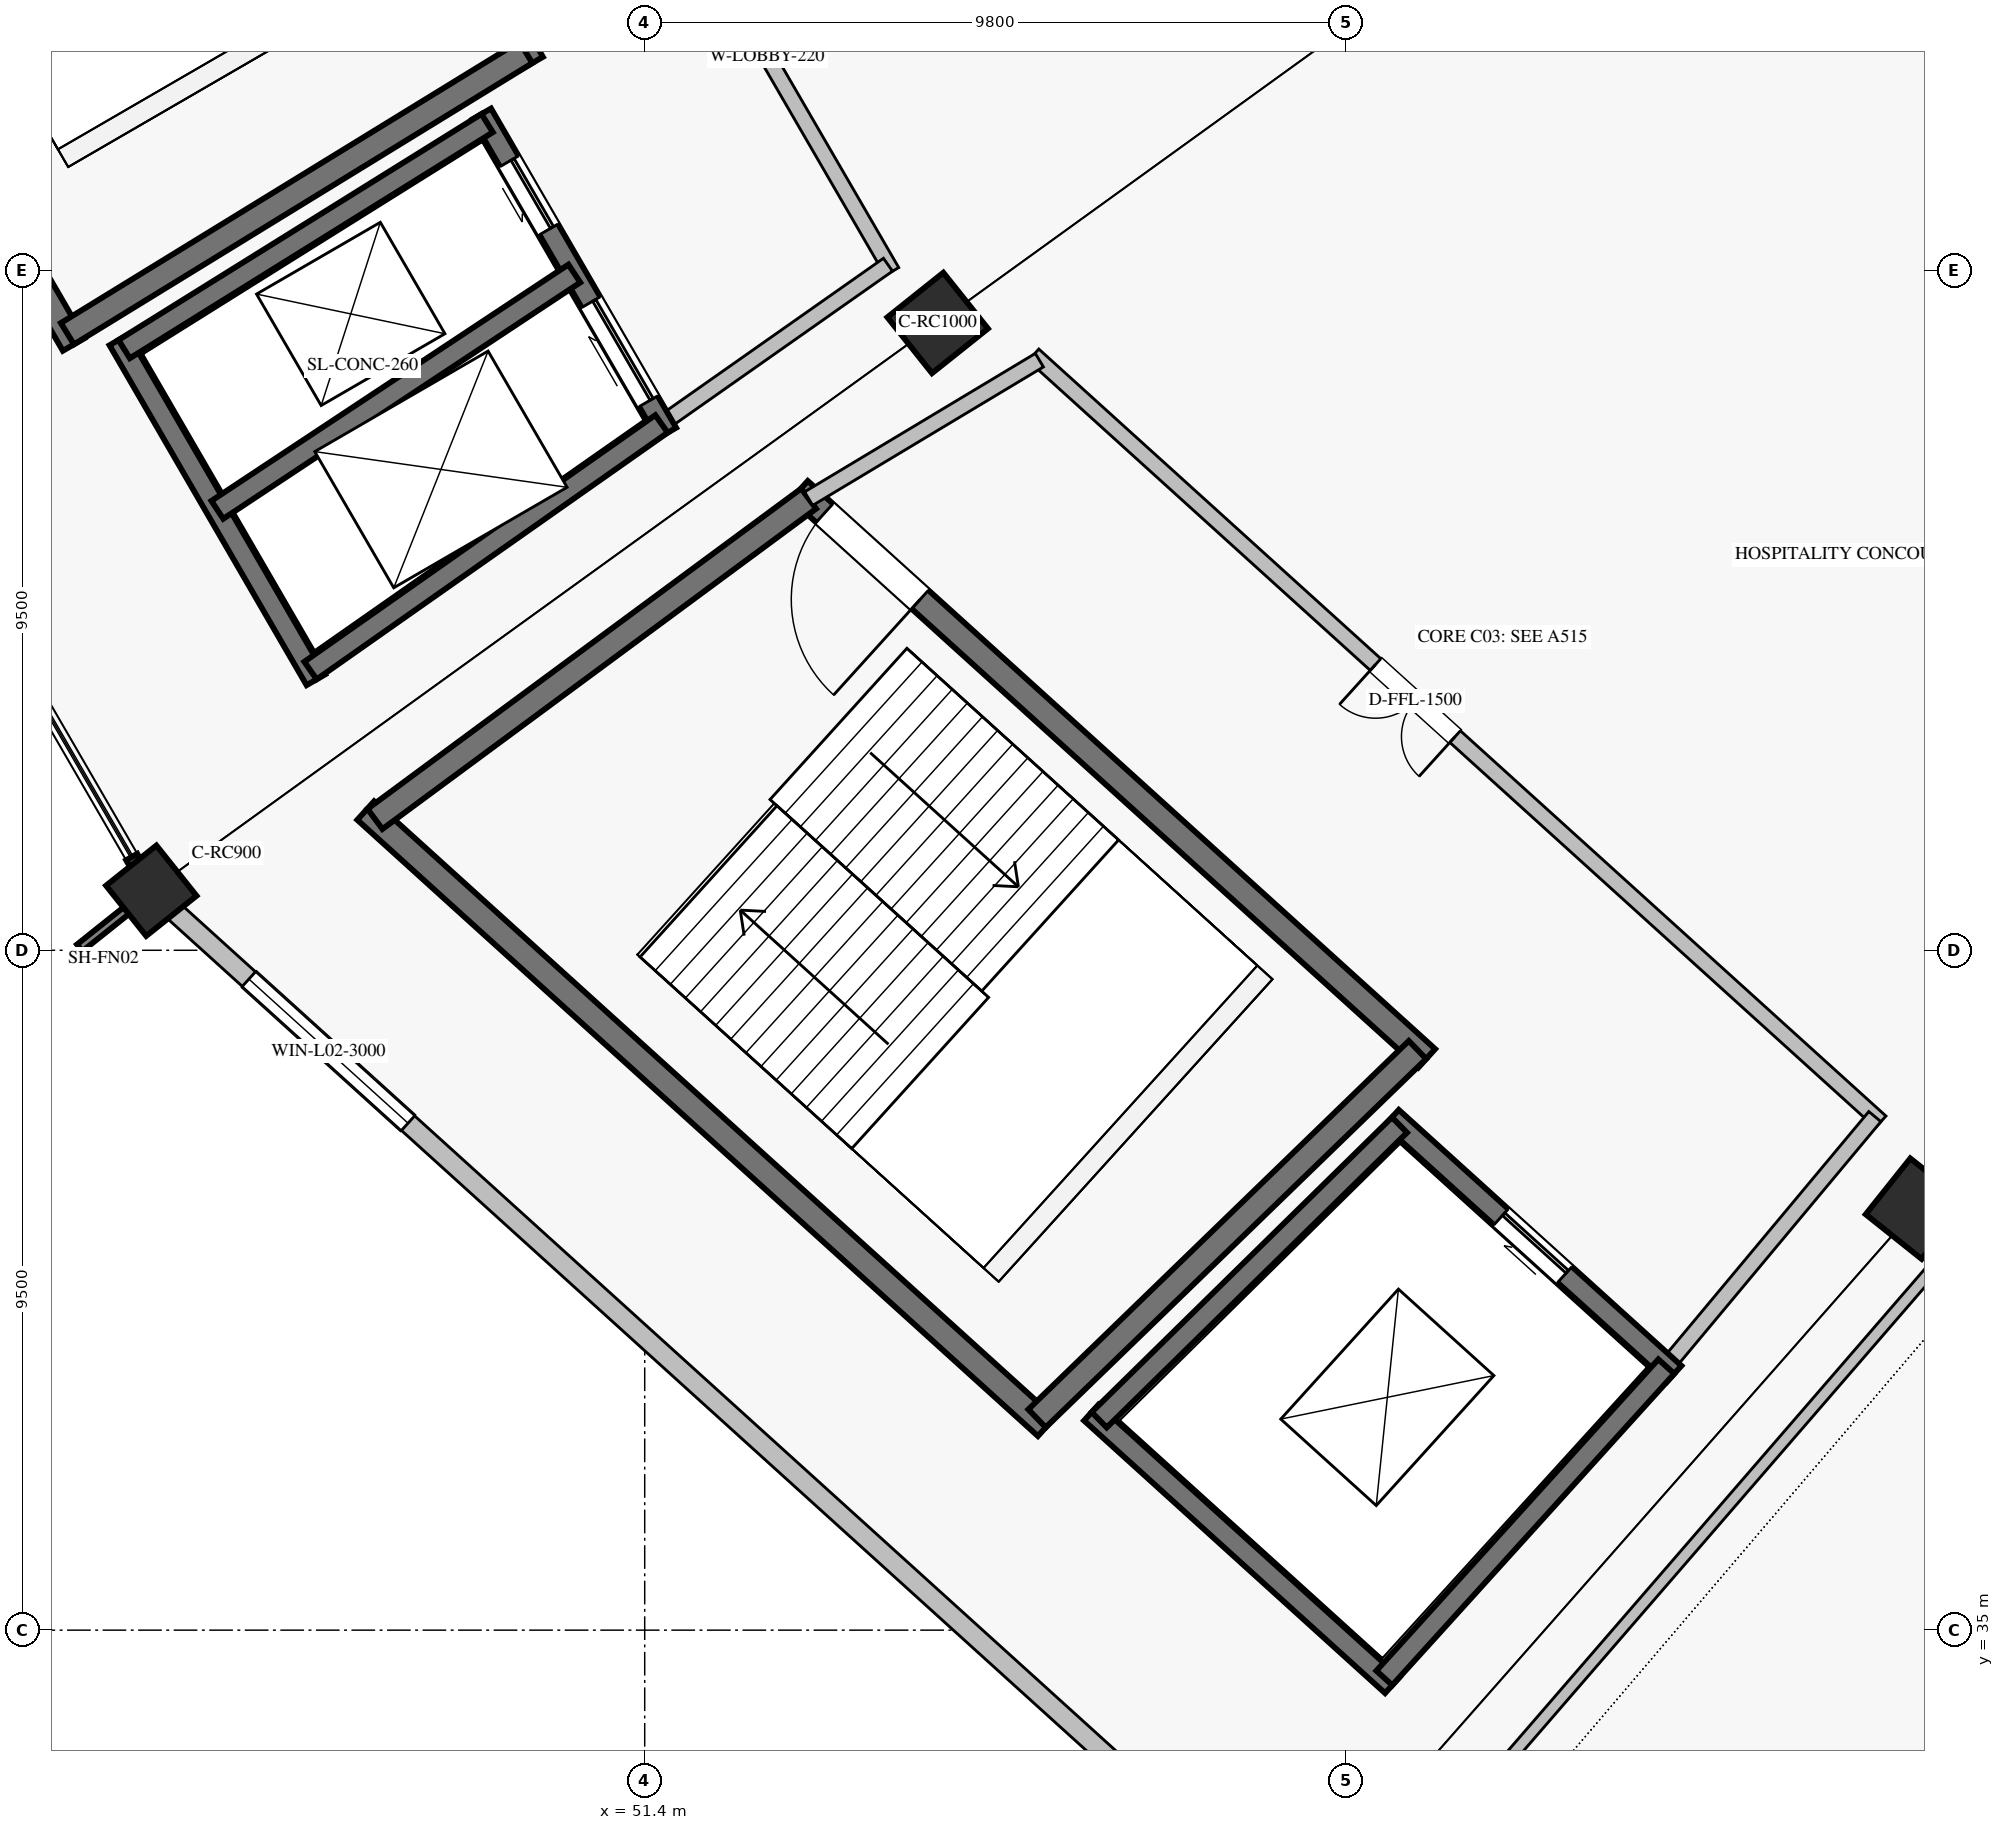
"""IFC4 building model, lengths in metres.
Left out: names, types, materials, properties, quantities, classifications, styles, units other than length and angle.
Written with IfcOpenShell. Run it as: python <this file> out.ifc"""

import sys

from ifc_helpers import new_model, si_unit, direction, frame, frame_2d, origin, origin_2d, place, context, subcontext, project, spatial, rectangle, extrude, element, fill, save


model = new_model("IFC4")
c1 = context("Model", 3, precision=1e-05, world=origin(), true_north=direction((0.0, 1.0)))
c2 = subcontext(c1, "Body", "Model", "MODEL_VIEW")
j1 = project(units=[si_unit("LENGTHUNIT", "METRE"), si_unit("PLANEANGLEUNIT", "RADIAN")], contexts=[c1])
p1 = place(None, origin())
s1 = spatial("IfcSite", under=j1, at=p1, CompositionType="ELEMENT")
p2 = place(p1, origin())
s2 = spatial("IfcBuilding", under=s1, at=p2, CompositionType="ELEMENT")
p3 = place(p2, frame((0.0, 0.0, 10.54)))
s3 = spatial("IfcBuildingStorey", under=s2, at=p3, CompositionType="ELEMENT", Elevation=10.54)
for number, where, z_axis, x_axis in (
    (1, (55.494, 53.266, 0.0), (0.0, 0.0, 1.0), (-0.782, -0.623, 0.0)),
    (2, (69.166, 40.889, 0.0), (0.0, 0.0, 1.0), (-0.623, -0.782, 0.0)),
):
    element("IfcColumn", number, at=place(p3, frame(where, z_axis=z_axis, x_axis=x_axis)), inside=s3, PredefinedType="COLUMN", context=c2, shape_type="SweptSolid", body=[
        extrude(rectangle(XDim=1.0, YDim=1.0, at=origin_2d()), origin(), (0.0, 0.0, 1.0), 5.1),
    ])
p4 = place(p3, frame((44.505, 45.332, 0.0), z_axis=(0.0, 0.0, 1.0), x_axis=(-0.781831482473, -0.623489801853, 0.0)))
e3 = element("IfcColumn", 3, at=p4, inside=s3, PredefinedType="COLUMN", context=c2, shape_type="SweptSolid", body=[
    extrude(rectangle(XDim=0.9, YDim=0.9, at=origin_2d()), origin(), (0.0, 0.0, 1.0), 5.1),
])
p5 = place(p3, frame((44.831, 45.037, 0.0), z_axis=(0.0, 0.0, 1.0), x_axis=(0.741352367697, -0.671115986183, 0.0)))
e4 = element("IfcWall", 4, at=p5, inside=s3, PredefinedType="SOLIDWALL", context=c2, shape_type="SweptSolid", body=[
    extrude(rectangle(XDim=20.564, YDim=0.275, at=frame_2d((10.282, 0.0))), origin(), (0.0, 0.0, 1.0), 4.138),
])
p6 = place(p5, frame((1.4, 0.0, 1.0)))
e5 = element("IfcOpeningElement", 5, at=p6, cuts=e4, PredefinedType="OPENING", context=c2, shape_type="SweptSolid", body=[
    extrude(rectangle(XDim=3.0, YDim=2.1, at=frame_2d((1.5, 1.05))), frame((0.0, 0.147, 0.0), z_axis=(0.0, -1.0, 0.0), x_axis=(1.0, 0.0, 0.0)), (0.0, 0.0, 1.0), 0.295),
])
p7 = place(p3, frame((44.09, 66.788, 0.0), z_axis=(0.0, 0.0, 1.0), x_axis=(0.501628624814, -0.865083072755, 0.0)))
e6 = element("IfcWall", 6, at=p7, inside=s3, PredefinedType="SHEAR", context=c2, shape_type="SweptSolid", body=[
    extrude(rectangle(XDim=11.435, YDim=0.35, at=frame_2d((5.718, 0.0))), origin(), (0.0, 0.0, 1.0), 4.84),
])
p8 = place(p7, frame((0.475, 0.0, 0.0)))
e7 = element("IfcOpeningElement", 7, at=p8, cuts=e6, PredefinedType="OPENING", context=c2, shape_type="SweptSolid", body=[
    extrude(rectangle(XDim=1.8, YDim=2.2, at=frame_2d((0.9, 1.1))), frame((0.0, 0.185, 0.0), z_axis=(0.0, -1.0, 0.0), x_axis=(1.0, 0.0, 0.0)), (0.0, 0.0, 1.0), 0.37),
])
p9 = place(p3, frame((37.198, 63.695, 0.0), z_axis=(0.0, 0.0, 1.0), x_axis=(0.501601740165, -0.865098661577, 0.0)))
e8 = element("IfcWall", 8, at=p9, inside=s3, PredefinedType="SHEAR", context=c2, shape_type="SweptSolid", body=[
    extrude(rectangle(XDim=12.405, YDim=0.35, at=frame_2d((6.202, 0.0))), origin(), (0.0, 0.0, 1.0), 4.84),
])
p10 = place(p3, frame((49.739, 57.046, 0.0), z_axis=(0.0, 0.0, 1.0), x_axis=(-0.852334575619, -0.522996913188, 0.0)))
e9 = element("IfcWall", 9, at=p10, inside=s3, PredefinedType="SHEAR", context=c2, shape_type="SweptSolid", body=[
    extrude(rectangle(XDim=7.516, YDim=0.35, at=frame_2d((3.758, 0.0))), origin(), (0.0, 0.0, 1.0), 4.84),
])
p11 = place(p3, frame((49.123, 56.188, 0.0), z_axis=(0.0, 0.0, 1.0), x_axis=(0.501629534056, -0.86508254552, 0.0)))
e10 = element("IfcWall", 10, at=p11, inside=s3, PredefinedType="SHEAR", context=c2, shape_type="SweptSolid", body=[
    extrude(rectangle(XDim=5.157, YDim=0.3, at=frame_2d((2.579, 0.0))), origin(), (0.0, 0.0, 1.0), 4.84),
])
p12 = place(p11, frame((0.766, 0.0, 0.0)))
e11 = element("IfcOpeningElement", 11, at=p12, cuts=e10, PredefinedType="OPENING", context=c2, shape_type="SweptSolid", body=[
    extrude(rectangle(XDim=1.1, YDim=2.2, at=frame_2d((0.55, 1.1))), frame((0.0, 0.16, 0.0), z_axis=(0.0, -1.0, 0.0), x_axis=(1.0, 0.0, 0.0)), (0.0, 0.0, 1.0), 0.32),
])
p13 = place(p11, frame((3.042, 0.0, 0.0)))
e12 = element("IfcOpeningElement", 12, at=p13, cuts=e10, PredefinedType="OPENING", context=c2, shape_type="SweptSolid", body=[
    extrude(rectangle(XDim=1.6, YDim=2.3, at=frame_2d((0.8, 1.15))), frame((0.0, 0.16, 0.0), z_axis=(0.0, -1.0, 0.0), x_axis=(1.0, 0.0, 0.0)), (0.0, 0.0, 1.0), 0.32),
])
p14 = place(p3, frame((44.05, 53.03, 0.0), z_axis=(0.0, 0.0, 1.0), x_axis=(0.501596987756, -0.865101417103, 0.0)))
e13 = element("IfcWall", 13, at=p14, inside=s3, PredefinedType="SHEAR", context=c2, shape_type="SweptSolid", body=[
    extrude(rectangle(XDim=5.491, YDim=0.3, at=frame_2d((2.746, 0.0))), origin(), (0.0, 0.0, 1.0), 4.84),
])
p15 = place(p3, frame((49.198, 56.058, 0.0), z_axis=(0.0, 0.0, 1.0), x_axis=(-0.848938067893, -0.528492343257, 0.0)))
e14 = element("IfcWall", 14, at=p15, inside=s3, PredefinedType="SHEAR", context=c2, shape_type="SweptSolid", body=[
    extrude(rectangle(XDim=5.975, YDim=0.3, at=frame_2d((2.988, 0.0))), origin(), (0.0, 0.0, 1.0), 4.84),
])
p16 = place(p3, frame((51.635, 51.855, 0.0), z_axis=(0.0, 0.0, 1.0), x_axis=(-0.818205158105, -0.574926359851, 0.0)))
e15 = element("IfcWall", 15, at=p16, inside=s3, PredefinedType="SHEAR", context=c2, shape_type="SweptSolid", body=[
    extrude(rectangle(XDim=5.995, YDim=0.3, at=frame_2d((2.998, 0.0))), origin(), (0.0, 0.0, 1.0), 4.84),
])
p17 = place(p3, frame((50.417, 53.957, 0.0), z_axis=(0.0, 0.0, 1.0), x_axis=(-0.833878900042, -0.551947443209, 0.0)))
e16 = element("IfcWall", 16, at=p17, inside=s3, PredefinedType="SHEAR", context=c2, shape_type="SweptSolid", body=[
    extrude(rectangle(XDim=5.983, YDim=0.3, at=frame_2d((2.991, 0.0))), origin(), (0.0, 0.0, 1.0), 4.84),
])
p18 = place(p3, frame((46.774, 67.921, 0.0), z_axis=(0.0, 0.0, 1.0), x_axis=(0.501612626242, -0.865092349518, 0.0)))
e17 = element("IfcWall", 17, at=p18, inside=s3, PredefinedType="SOLIDWALL", context=c2, shape_type="SweptSolid", body=[
    extrude(rectangle(XDim=16.11, YDim=0.22, at=frame_2d((8.055, 0.0))), origin(), (0.0, 0.0, 1.0), 3.788),
])
p19 = place(p18, frame((6.511, 0.0, 0.0)))
e18 = element("IfcOpeningElement", 18, at=p19, cuts=e17, PredefinedType="OPENING", context=c2, shape_type="SweptSolid", body=[
    extrude(rectangle(XDim=1.5, YDim=2.2, at=frame_2d((0.75, 1.1))), frame((0.0, 0.12, 0.0), z_axis=(0.0, -1.0, 0.0), x_axis=(1.0, 0.0, 0.0)), (0.0, 0.0, 1.0), 0.24),
])
p20 = place(p3, frame((54.8, 54.079, 0.0), z_axis=(0.0, 0.0, 1.0), x_axis=(-0.818225400643, -0.574897550649, 0.0)))
e19 = element("IfcWall", 19, at=p20, inside=s3, PredefinedType="SOLIDWALL", context=c2, shape_type="SweptSolid", body=[
    extrude(rectangle(XDim=3.868, YDim=0.22, at=frame_2d((1.934, 0.0))), origin(), (0.0, 0.0, 1.0), 4.84),
])
p21 = place(p3, frame((53.561, 50.928, 0.0), z_axis=(0.0, 0.0, 1.0), x_axis=(0.741358227035, -0.671109513572, 0.0)))
e20 = element("IfcWall", 20, at=p21, inside=s3, PredefinedType="SHEAR", context=c2, shape_type="SweptSolid", body=[
    extrude(rectangle(XDim=11.827, YDim=0.35, at=frame_2d((5.913, 0.0))), origin(), (0.0, 0.0, 1.0), 4.84),
])
p22 = place(p21, frame((0.475, 0.0, 0.0)))
e21 = element("IfcOpeningElement", 21, at=p22, cuts=e20, PredefinedType="OPENING", context=c2, shape_type="SweptSolid", body=[
    extrude(rectangle(XDim=1.8, YDim=2.2, at=frame_2d((0.9, 1.1))), frame((0.0, 0.185, 0.0), z_axis=(0.0, -1.0, 0.0), x_axis=(1.0, 0.0, 0.0)), (0.0, 0.0, 1.0), 0.37),
])
p23 = place(p3, frame((47.501, 46.452, 0.0), z_axis=(0.0, 0.0, 1.0), x_axis=(0.741351373721, -0.671117084183, 0.0)))
e22 = element("IfcWall", 22, at=p23, inside=s3, PredefinedType="SHEAR", context=c2, shape_type="SweptSolid", body=[
    extrude(rectangle(XDim=12.83, YDim=0.35, at=frame_2d((6.415, 0.0))), origin(), (0.0, 0.0, 1.0), 4.84),
])
p24 = place(p3, frame((53.691, 50.811, 0.0), z_axis=(0.0, 0.0, 1.0), x_axis=(-0.804395625347, -0.594093997548, 0.0)))
e23 = element("IfcWall", 23, at=p24, inside=s3, PredefinedType="SHEAR", context=c2, shape_type="SweptSolid", body=[
    extrude(rectangle(XDim=7.534, YDim=0.35, at=frame_2d((3.767, 0.0))), origin(), (0.0, 0.0, 1.0), 4.84),
])
p25 = place(p3, frame((62.199, 43.108, 0.0), z_axis=(0.0, 0.0, 1.0), x_axis=(-0.718297398554, -0.69573619083, 0.0)))
e24 = element("IfcWall", 24, at=p25, inside=s3, PredefinedType="SHEAR", context=c2, shape_type="SweptSolid", body=[
    extrude(rectangle(XDim=7.402, YDim=0.35, at=frame_2d((3.701, 0.0))), origin(), (0.0, 0.0, 1.0), 4.84),
])
p26 = place(p3, frame((61.837, 42.159, 0.0), z_axis=(0.0, 0.0, 1.0), x_axis=(0.741350155641, -0.671118429736, 0.0)))
e25 = element("IfcWall", 25, at=p26, inside=s3, PredefinedType="SHEAR", context=c2, shape_type="SweptSolid", body=[
    extrude(rectangle(XDim=5.329, YDim=0.3, at=frame_2d((2.665, 0.0))), origin(), (0.0, 0.0, 1.0), 4.84),
])
p27 = place(p26, frame((2.065, 0.0, 0.0)))
e26 = element("IfcOpeningElement", 26, at=p27, cuts=e25, PredefinedType="OPENING", context=c2, shape_type="SweptSolid", body=[
    extrude(rectangle(XDim=1.2, YDim=2.2, at=frame_2d((0.6, 1.1))), frame((0.0, 0.16, 0.0), z_axis=(0.0, -1.0, 0.0), x_axis=(1.0, 0.0, 0.0)), (0.0, 0.0, 1.0), 0.32),
])
p28 = place(p3, frame((57.64, 38.039, 0.0), z_axis=(0.0, 0.0, 1.0), x_axis=(0.74134208775, -0.671127341815, 0.0)))
e27 = element("IfcWall", 27, at=p28, inside=s3, PredefinedType="SHEAR", context=c2, shape_type="SweptSolid", body=[
    extrude(rectangle(XDim=5.675, YDim=0.3, at=frame_2d((2.837, 0.0))), origin(), (0.0, 0.0, 1.0), 4.84),
])
p29 = place(p3, frame((61.948, 42.059, 0.0), z_axis=(0.0, 0.0, 1.0), x_axis=(-0.713553028001, -0.700601224828, 0.0)))
e28 = element("IfcWall", 28, at=p29, inside=s3, PredefinedType="SHEAR", context=c2, shape_type="SweptSolid", body=[
    extrude(rectangle(XDim=5.881, YDim=0.3, at=frame_2d((2.94, 0.0))), origin(), (0.0, 0.0, 1.0), 4.84),
])
p30 = place(p3, frame((65.676, 38.684, 0.0), z_axis=(0.0, 0.0, 1.0), x_axis=(-0.67115829282, -0.741314067031, 0.0)))
e29 = element("IfcWall", 29, at=p30, inside=s3, PredefinedType="SHEAR", context=c2, shape_type="SweptSolid", body=[
    extrude(rectangle(XDim=5.871, YDim=0.3, at=frame_2d((2.935, 0.0))), origin(), (0.0, 0.0, 1.0), 4.84),
])
p31 = place(p3, frame((56.834, 52.819, 0.0), z_axis=(0.0, 0.0, 1.0), x_axis=(0.741351035574, -0.671117457717, 0.0)))
e30 = element("IfcWall", 30, at=p31, inside=s3, PredefinedType="SOLIDWALL", context=c2, shape_type="SweptSolid", body=[
    extrude(rectangle(XDim=15.969, YDim=0.22, at=frame_2d((7.985, 0.0))), origin(), (0.0, 0.0, 1.0), 4.84),
])
p32 = place(p31, frame((6.447, 0.0, 0.0)))
e31 = element("IfcOpeningElement", 31, at=p32, cuts=e30, PredefinedType="OPENING", context=c2, shape_type="SweptSolid", body=[
    extrude(rectangle(XDim=1.5, YDim=2.2, at=frame_2d((0.75, 1.1))), frame((0.0, 0.12, 0.0), z_axis=(0.0, -1.0, 0.0), x_axis=(1.0, 0.0, 0.0)), (0.0, 0.0, 1.0), 0.24),
])
p33 = place(p3, frame((56.915, 52.746, 0.0), z_axis=(0.0, 0.0, 1.0), x_axis=(-0.857424171966, -0.514610327654, 0.0)))
e32 = element("IfcWall", 32, at=p33, inside=s3, PredefinedType="SOLIDWALL", context=c2, shape_type="SweptSolid", body=[
    extrude(rectangle(XDim=3.76, YDim=0.22, at=frame_2d((1.88, 0.0))), origin(), (0.0, 0.0, 1.0), 4.84),
])
p34 = place(p3, frame((68.591, 42.176, 0.0), z_axis=(0.0, 0.0, 1.0), x_axis=(-0.640759627034, -0.767741558315, 0.0)))
e33 = element("IfcWall", 33, at=p34, inside=s3, PredefinedType="SOLIDWALL", context=c2, shape_type="SweptSolid", body=[
    extrude(rectangle(XDim=4.549, YDim=0.22, at=frame_2d((2.274, 0.0))), origin(), (0.0, 0.0, 1.0), 4.84),
])
p35 = place(p3, frame((69.599, 40.28, 0.0), z_axis=(0.0, 0.0, 1.0), x_axis=(-0.654293035882, -0.756241114458, 0.0)))
e34 = element("IfcWall", 34, at=p35, inside=s3, PredefinedType="PARTITIONING", context=c2, shape_type="SweptSolid", body=[
    extrude(rectangle(XDim=12.091, YDim=0.165, at=frame_2d((6.045, 0.0))), origin(), (0.0, 0.0, 1.0), 4.16),
])
p36 = place(p6, origin())
e35 = element("IfcWindow", 35, at=p36, inside=s3, PartitioningType="SINGLE_PANEL", PredefinedType="WINDOW", context=c2, shape_type="SweptSolid", body=[
    extrude(rectangle(XDim=3.0, YDim=2.1, at=frame_2d((1.5, 1.05))), frame((0.0, 0.03, 0.0), z_axis=(0.0, -1.0, 0.0), x_axis=(1.0, 0.0, 0.0)), (0.0, 0.0, 1.0), 0.06),
])
fill(e5, e35)
p37 = place(p12, origin())
e36 = element("IfcDoor", 36, at=p37, inside=s3, OperationType="SLIDING_TO_RIGHT", PredefinedType="DOOR", context=c2, shape_type="SweptSolid", body=[
    extrude(rectangle(XDim=1.1, YDim=2.2, at=frame_2d((0.55, 1.1))), frame((0.0, 0.025, 0.0), z_axis=(0.0, -1.0, 0.0), x_axis=(1.0, 0.0, 0.0)), (0.0, 0.0, 1.0), 0.05),
])
fill(e11, e36)
p38 = place(p13, origin())
e37 = element("IfcDoor", 37, at=p38, inside=s3, OperationType="SLIDING_TO_LEFT", PredefinedType="DOOR", context=c2, shape_type="SweptSolid", body=[
    extrude(rectangle(XDim=1.6, YDim=2.3, at=frame_2d((0.8, 1.15))), frame((0.0, 0.025, 0.0), z_axis=(0.0, -1.0, 0.0), x_axis=(1.0, 0.0, 0.0)), (0.0, 0.0, 1.0), 0.05),
])
fill(e12, e37)
p39 = place(p22, frame((1.8, 0.0, 0.0), z_axis=(0.0, 0.0, 1.0), x_axis=(-1.0, 0.0, 0.0)))
e38 = element("IfcDoor", 38, at=p39, inside=s3, OperationType="SINGLE_SWING_LEFT", PredefinedType="DOOR", context=c2, shape_type="SweptSolid", body=[
    extrude(rectangle(XDim=1.8, YDim=2.2, at=frame_2d((0.9, 1.1))), frame((0.0, 0.025, 0.0), z_axis=(0.0, -1.0, 0.0), x_axis=(1.0, 0.0, 0.0)), (0.0, 0.0, 1.0), 0.05),
])
fill(e21, e38)
p40 = place(p27, origin())
e39 = element("IfcDoor", 39, at=p40, inside=s3, OperationType="SLIDING_TO_LEFT", PredefinedType="DOOR", context=c2, shape_type="SweptSolid", body=[
    extrude(rectangle(XDim=1.2, YDim=2.2, at=frame_2d((0.6, 1.1))), frame((0.0, 0.025, 0.0), z_axis=(0.0, -1.0, 0.0), x_axis=(1.0, 0.0, 0.0)), (0.0, 0.0, 1.0), 0.05),
])
fill(e26, e39)
p41 = place(p32, frame((1.5, 0.0, 0.0), z_axis=(0.0, 0.0, 1.0), x_axis=(-1.0, 0.0, 0.0)))
e40 = element("IfcDoor", 40, at=p41, inside=s3, OperationType="DOUBLE_DOOR_SINGLE_SWING", PredefinedType="DOOR", context=c2, shape_type="SweptSolid", body=[
    extrude(rectangle(XDim=1.5, YDim=2.2, at=frame_2d((0.75, 1.1))), frame((0.0, 0.025, 0.0), z_axis=(0.0, -1.0, 0.0), x_axis=(1.0, 0.0, 0.0)), (0.0, 0.0, 1.0), 0.05),
])
fill(e31, e40)
save(model, sys.argv[1])
